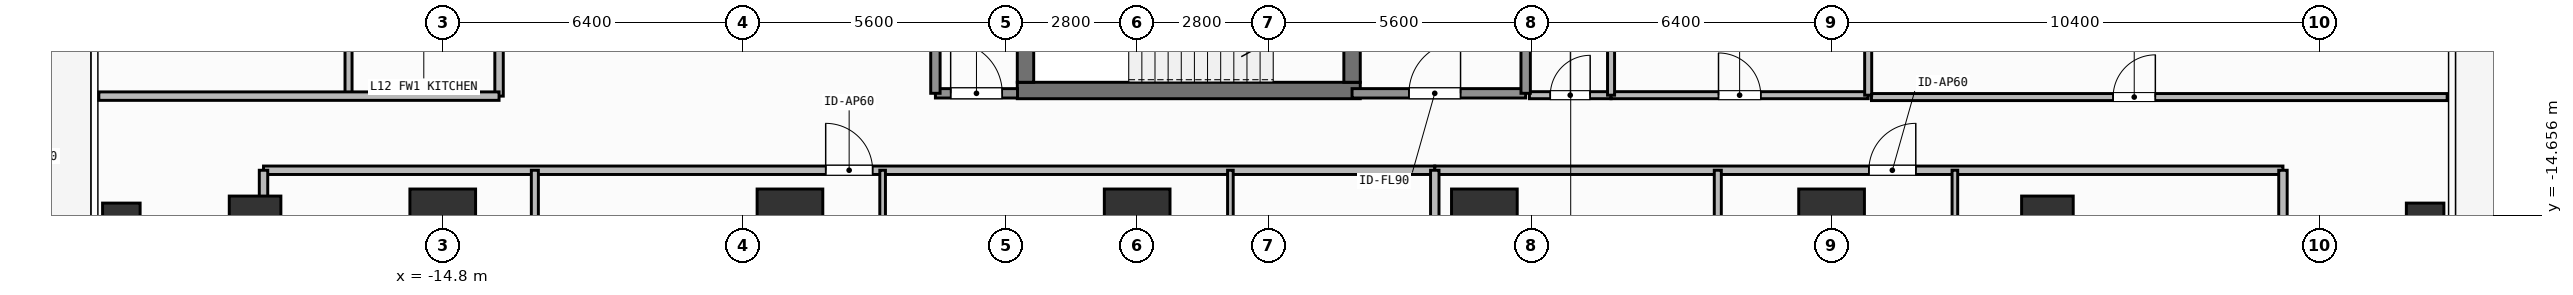
"""IFC4 building model, lengths in metres.
Left out: names, types, materials, properties, quantities, classifications, styles, units other than length and angle.
Written with IfcOpenShell. Run it as: python <this file> out.ifc"""

import sys

from ifc_helpers import new_model, si_unit, direction, frame, frame_2d, origin, origin_2d, place, context, subcontext, project, spatial, rectangle, hollow_rectangle, extrude, element, fill, save


model = new_model("IFC4")
c1 = context("Model", 3, precision=1e-05, world=origin(), true_north=direction((0.0, 1.0)))
c2 = subcontext(c1, "Body", "Model", "MODEL_VIEW")
j1 = project(units=[si_unit("LENGTHUNIT", "METRE"), si_unit("PLANEANGLEUNIT", "RADIAN")], contexts=[c1])
p1 = place(None, origin())
s1 = spatial("IfcSite", under=j1, at=p1, CompositionType="ELEMENT")
p2 = place(p1, origin())
s2 = spatial("IfcBuilding", under=s1, at=p2, CompositionType="ELEMENT")
p3 = place(p2, frame((0.0, 0.0, 46.2)))
s3 = spatial("IfcBuildingStorey", under=s2, at=p3, CompositionType="ELEMENT", Elevation=46.2)
p4 = place(p3, frame((-2.555, -12.0, 0.0), z_axis=(0.0, 0.0, 1.0), x_axis=(1.0, 0.0, 0.0)))
e1 = element("IfcWall", 1, at=p4, inside=s3, PredefinedType="SHEAR", context=c2, shape_type="SweptSolid", body=[
    extrude(rectangle(XDim=7.31, YDim=0.35, at=frame_2d((3.655, 0.0))), origin(), (0.0, 0.0, 1.0), 3.9),
])
p5 = place(p3, frame((-2.38, -11.825, 0.0), z_axis=(0.0, 0.0, 1.0), x_axis=(0.0, 1.0, 0.0)))
e2 = element("IfcWall", 2, at=p5, inside=s3, PredefinedType="SHEAR", context=c2, shape_type="SweptSolid", body=[
    extrude(rectangle(XDim=2.925, YDim=0.35, at=frame_2d((1.462, 0.0))), origin(), (0.0, 0.0, 1.0), 3.9),
])
p6 = place(p3, frame((4.58, -8.9, 0.0), z_axis=(0.0, 0.0, 1.0), x_axis=(0.0, -1.0, 0.0)))
e3 = element("IfcWall", 3, at=p6, inside=s3, PredefinedType="SHEAR", context=c2, shape_type="SweptSolid", body=[
    extrude(rectangle(XDim=2.925, YDim=0.35, at=frame_2d((1.462, 0.0))), origin(), (0.0, 0.0, 1.0), 3.9),
])
p7 = place(p6, frame((0.913, 0.0, 0.0)))
e4 = element("IfcOpeningElement", 4, at=p7, cuts=e3, PredefinedType="OPENING", context=c2, shape_type="SweptSolid", body=[
    extrude(rectangle(XDim=1.1, YDim=2.15, at=frame_2d((0.55, 1.075))), frame((0.0, 0.185, 0.0), z_axis=(0.0, -1.0, 0.0), x_axis=(1.0, 0.0, 0.0)), (0.0, 0.0, 1.0), 0.37),
])
for number, where, z_axis, x_axis in (
    (5, (-14.8, -14.8, 0.0), (0.0, 0.0, 1.0), (1.0, 0.0, 0.0)),
    (6, (-7.4, -14.8, 0.0), (0.0, 0.0, 1.0), (1.0, 0.0, 0.0)),
    (7, (0.0, -14.8, 0.0), (0.0, 0.0, 1.0), (1.0, 0.0, 0.0)),
    (8, (7.4, -14.8, 0.0), (0.0, 0.0, 1.0), (1.0, 0.0, 0.0)),
    (9, (14.8, -14.8, 0.0), (0.0, 0.0, 1.0), (1.0, 0.0, 0.0)),
):
    element("IfcColumn", number, at=place(p3, frame(where, z_axis=z_axis, x_axis=x_axis)), inside=s3, PredefinedType="COLUMN", context=c2, shape_type="SweptSolid", body=[
        extrude(rectangle(XDim=1.4, YDim=1.4, at=origin_2d()), origin(), (0.0, 0.0, 1.0), 3.9),
    ])
for number, where, z_axis, x_axis in (
    (10, (-18.8, -14.8, 0.0), (0.0, 0.0, 1.0), (1.0, 0.0, 0.0)),
    (11, (19.4, -14.8, 0.0), (0.0, 0.0, 1.0), (1.0, 0.0, 0.0)),
):
    element("IfcColumn", number, at=place(p3, frame(where, z_axis=z_axis, x_axis=x_axis)), inside=s3, PredefinedType="COLUMN", context=c2, shape_type="SweptSolid", body=[
        extrude(rectangle(XDim=1.1, YDim=1.1, at=origin_2d()), origin(), (0.0, 0.0, 1.0), 3.9),
    ])
for number, where, z_axis, x_axis in (
    (12, (-21.65, -14.8, 0.0), (0.0, 0.0, 1.0), (1.0, 0.0, 0.0)),
    (13, (27.45, -14.8, 0.0), (0.0, 0.0, 1.0), (1.0, 0.0, 0.0)),
):
    element("IfcColumn", number, at=place(p3, frame(where, z_axis=z_axis, x_axis=x_axis)), inside=s3, PredefinedType="COLUMN", context=c2, shape_type="SweptSolid", body=[
        extrude(hollow_rectangle(XDim=0.8, YDim=0.8, WallThickness=0.036, at=origin_2d()), origin(), (0.0, 0.0, 1.0), 3.9),
    ])
p8 = place(p3, frame((4.58, -12.06, 0.0), z_axis=(0.0, 0.0, 1.0), x_axis=(1.0, 0.0, 0.0)))
e14 = element("IfcWall", 14, at=p8, inside=s3, PredefinedType="SOLIDWALL", context=c2, shape_type="SweptSolid", body=[
    extrude(rectangle(XDim=3.7, YDim=0.2, at=frame_2d((1.85, 0.0))), origin(), (0.0, 0.0, 1.0), 3.68),
])
p9 = place(p8, frame((1.212, 0.0, 0.0)))
e15 = element("IfcOpeningElement", 15, at=p9, cuts=e14, PredefinedType="OPENING", context=c2, shape_type="SweptSolid", body=[
    extrude(rectangle(XDim=1.1, YDim=2.15, at=frame_2d((0.55, 1.075))), frame((0.0, 0.11, 0.0), z_axis=(0.0, -1.0, 0.0), x_axis=(1.0, 0.0, 0.0)), (0.0, 0.0, 1.0), 0.22),
])
p10 = place(p3, frame((-4.3, -12.06, 0.0), z_axis=(0.0, 0.0, 1.0), x_axis=(1.0, 0.0, 0.0)))
e16 = element("IfcWall", 16, at=p10, inside=s3, PredefinedType="SOLIDWALL", context=c2, shape_type="SweptSolid", body=[
    extrude(rectangle(XDim=1.75, YDim=0.2, at=frame_2d((0.875, 0.0))), origin(), (0.0, 0.0, 1.0), 3.68),
])
p11 = place(p10, frame((0.325, 0.0, 0.0)))
e17 = element("IfcOpeningElement", 17, at=p11, cuts=e16, PredefinedType="OPENING", context=c2, shape_type="SweptSolid", body=[
    extrude(rectangle(XDim=1.1, YDim=2.15, at=frame_2d((0.55, 1.075))), frame((0.0, 0.11, 0.0), z_axis=(0.0, -1.0, 0.0), x_axis=(1.0, 0.0, 0.0)), (0.0, 0.0, 1.0), 0.22),
])
p12 = place(p3, frame((8.36, -12.1, 0.0), z_axis=(0.0, 0.0, 1.0), x_axis=(1.0, 0.0, 0.0)))
e18 = element("IfcWall", 18, at=p12, inside=s3, PredefinedType="PARTITIONING", context=c2, shape_type="SweptSolid", body=[
    extrude(rectangle(XDim=1.74, YDim=0.15, at=frame_2d((0.87, 0.0))), origin(), (0.0, 0.0, 1.0), 3.68),
])
p13 = place(p12, frame((0.445, 0.0, 0.0)))
e19 = element("IfcOpeningElement", 19, at=p13, cuts=e18, PredefinedType="OPENING", context=c2, shape_type="SweptSolid", body=[
    extrude(rectangle(XDim=0.85, YDim=2.1, at=frame_2d((0.425, 1.05))), frame((0.0, 0.085, 0.0), z_axis=(0.0, -1.0, 0.0), x_axis=(1.0, 0.0, 0.0)), (0.0, 0.0, 1.0), 0.17),
])
p14 = place(p3, frame((10.1, -12.1, 0.0), z_axis=(0.0, 0.0, 1.0), x_axis=(1.0, 0.0, 0.0)))
e20 = element("IfcWall", 20, at=p14, inside=s3, PredefinedType="PARTITIONING", context=c2, shape_type="SweptSolid", body=[
    extrude(rectangle(XDim=5.48, YDim=0.15, at=frame_2d((2.74, 0.0))), origin(), (0.0, 0.0, 1.0), 3.68),
])
p15 = place(p14, frame((2.29, 0.0, 0.0)))
e21 = element("IfcOpeningElement", 21, at=p15, cuts=e20, PredefinedType="OPENING", context=c2, shape_type="SweptSolid", body=[
    extrude(rectangle(XDim=0.9, YDim=2.1, at=frame_2d((0.45, 1.05))), frame((0.0, 0.085, 0.0), z_axis=(0.0, -1.0, 0.0), x_axis=(1.0, 0.0, 0.0)), (0.0, 0.0, 1.0), 0.17),
])
p16 = place(p3, frame((-18.62, -13.7, 0.0), z_axis=(0.0, 0.0, 1.0), x_axis=(1.0, 0.0, 0.0)))
e22 = element("IfcWall", 22, at=p16, inside=s3, PredefinedType="PARTITIONING", context=c2, shape_type="SweptSolid", body=[
    extrude(rectangle(XDim=24.963, YDim=0.18, at=frame_2d((12.481, 0.0))), origin(), (0.0, 0.0, 1.0), 3.68),
])
p17 = place(p16, frame((11.981, 0.0, 0.0)))
e23 = element("IfcOpeningElement", 23, at=p17, cuts=e22, PredefinedType="OPENING", context=c2, shape_type="SweptSolid", body=[
    extrude(rectangle(XDim=1.0, YDim=2.2, at=frame_2d((0.5, 1.1))), frame((0.0, 0.1, 0.0), z_axis=(0.0, -1.0, 0.0), x_axis=(1.0, 0.0, 0.0)), (0.0, 0.0, 1.0), 0.2),
])
p18 = place(p3, frame((-5.425, -20.79, 0.0), z_axis=(0.0, 0.0, 1.0), x_axis=(0.0, 1.0, 0.0)))
e24 = element("IfcWall", 24, at=p18, inside=s3, PredefinedType="PARTITIONING", context=c2, shape_type="SweptSolid", body=[
    extrude(rectangle(XDim=7.09, YDim=0.12, at=frame_2d((3.545, 0.0))), origin(), (0.0, 0.0, 1.0), 3.68),
])
p19 = place(p18, frame((2.117, 0.0, 0.0)))
e25 = element("IfcOpeningElement", 25, at=p19, cuts=e24, PredefinedType="OPENING", context=c2, shape_type="SweptSolid", body=[
    extrude(rectangle(XDim=0.9, YDim=2.1, at=frame_2d((0.45, 1.05))), frame((0.0, 0.07, 0.0), z_axis=(0.0, -1.0, 0.0), x_axis=(1.0, 0.0, 0.0)), (0.0, 0.0, 1.0), 0.14),
])
p20 = place(p3, frame((-12.837, -20.79, 0.0), z_axis=(0.0, 0.0, 1.0), x_axis=(0.0, 1.0, 0.0)))
e26 = element("IfcWall", 26, at=p20, inside=s3, PredefinedType="PARTITIONING", context=c2, shape_type="SweptSolid", body=[
    extrude(rectangle(XDim=7.09, YDim=0.15, at=frame_2d((3.545, 0.0))), origin(), (0.0, 0.0, 1.0), 3.68),
])
p21 = place(p20, frame((2.133, 0.0, 0.0)))
e27 = element("IfcOpeningElement", 27, at=p21, cuts=e26, PredefinedType="OPENING", context=c2, shape_type="SweptSolid", body=[
    extrude(rectangle(XDim=0.85, YDim=2.1, at=frame_2d((0.425, 1.05))), frame((0.0, 0.085, 0.0), z_axis=(0.0, -1.0, 0.0), x_axis=(1.0, 0.0, 0.0)), (0.0, 0.0, 1.0), 0.17),
])
p22 = place(p3, frame((1.987, -18.663, 0.0), z_axis=(0.0, 0.0, 1.0), x_axis=(0.0, 1.0, 0.0)))
e28 = element("IfcWall", 28, at=p22, inside=s3, PredefinedType="PARTITIONING", context=c2, shape_type="SweptSolid", body=[
    extrude(rectangle(XDim=4.963, YDim=0.12, at=frame_2d((2.481, 0.0))), origin(), (0.0, 0.0, 1.0), 3.68),
])
p23 = place(p22, frame((2.056, 0.0, 0.0)))
e29 = element("IfcOpeningElement", 29, at=p23, cuts=e28, PredefinedType="OPENING", context=c2, shape_type="SweptSolid", body=[
    extrude(rectangle(XDim=0.85, YDim=2.1, at=frame_2d((0.425, 1.05))), frame((0.0, 0.07, 0.0), z_axis=(0.0, -1.0, 0.0), x_axis=(1.0, 0.0, 0.0)), (0.0, 0.0, 1.0), 0.14),
])
p24 = place(p3, frame((6.343, -13.7, 0.0), z_axis=(0.0, 0.0, 1.0), x_axis=(1.0, 0.0, 0.0)))
e30 = element("IfcWall", 30, at=p24, inside=s3, PredefinedType="PARTITIONING", context=c2, shape_type="SweptSolid", body=[
    extrude(rectangle(XDim=18.077, YDim=0.18, at=frame_2d((9.039, 0.0))), origin(), (0.0, 0.0, 1.0), 3.68),
])
p25 = place(p24, frame((9.252, 0.0, 0.0)))
e31 = element("IfcOpeningElement", 31, at=p25, cuts=e30, PredefinedType="OPENING", context=c2, shape_type="SweptSolid", body=[
    extrude(rectangle(XDim=1.0, YDim=2.2, at=frame_2d((0.5, 1.1))), frame((0.0, 0.1, 0.0), z_axis=(0.0, -1.0, 0.0), x_axis=(1.0, 0.0, 0.0)), (0.0, 0.0, 1.0), 0.2),
])
p26 = place(p3, frame((12.375, -20.79, 0.0), z_axis=(0.0, 0.0, 1.0), x_axis=(0.0, 1.0, 0.0)))
e32 = element("IfcWall", 32, at=p26, inside=s3, PredefinedType="PARTITIONING", context=c2, shape_type="SweptSolid", body=[
    extrude(rectangle(XDim=7.09, YDim=0.15, at=frame_2d((3.545, 0.0))), origin(), (0.0, 0.0, 1.0), 3.68),
])
p27 = place(p26, frame((3.03, 0.0, 0.0)))
e33 = element("IfcOpeningElement", 33, at=p27, cuts=e32, PredefinedType="OPENING", context=c2, shape_type="SweptSolid", body=[
    extrude(rectangle(XDim=0.85, YDim=2.1, at=frame_2d((0.425, 1.05))), frame((0.0, 0.085, 0.0), z_axis=(0.0, -1.0, 0.0), x_axis=(1.0, 0.0, 0.0)), (0.0, 0.0, 1.0), 0.17),
])
p28 = place(p3, frame((17.428, -17.883, 0.0), z_axis=(0.0, 0.0, 1.0), x_axis=(0.0, 1.0, 0.0)))
e34 = element("IfcWall", 34, at=p28, inside=s3, PredefinedType="PARTITIONING", context=c2, shape_type="SweptSolid", body=[
    extrude(rectangle(XDim=4.183, YDim=0.12, at=frame_2d((2.092, 0.0))), origin(), (0.0, 0.0, 1.0), 3.68),
])
p29 = place(p28, frame((1.578, 0.0, 0.0)))
e35 = element("IfcOpeningElement", 35, at=p29, cuts=e34, PredefinedType="OPENING", context=c2, shape_type="SweptSolid", body=[
    extrude(rectangle(XDim=0.85, YDim=2.1, at=frame_2d((0.425, 1.05))), frame((0.0, 0.07, 0.0), z_axis=(0.0, -1.0, 0.0), x_axis=(1.0, 0.0, 0.0)), (0.0, 0.0, 1.0), 0.14),
])
p30 = place(p3, frame((-13.6, -12.12, 0.0), z_axis=(0.0, 0.0, 1.0), x_axis=(0.0, 1.0, 0.0)))
e36 = element("IfcWall", 36, at=p30, inside=s3, PredefinedType="PARTITIONING", context=c2, shape_type="SweptSolid", body=[
    extrude(rectangle(XDim=24.24, YDim=0.18, at=frame_2d((12.12, 0.0))), origin(), (0.0, 0.0, 1.0), 3.68),
])
p31 = place(p30, frame((9.829, 0.0, 0.0)))
e37 = element("IfcOpeningElement", 37, at=p31, cuts=e36, PredefinedType="OPENING", context=c2, shape_type="SweptSolid", body=[
    extrude(rectangle(XDim=1.0, YDim=2.2, at=frame_2d((0.5, 1.1))), frame((0.0, 0.1, 0.0), z_axis=(0.0, -1.0, 0.0), x_axis=(1.0, 0.0, 0.0)), (0.0, 0.0, 1.0), 0.2),
])
p32 = place(p3, frame((15.65, -12.14, 0.0), z_axis=(0.0, 0.0, 1.0), x_axis=(1.0, 0.0, 0.0)))
e38 = element("IfcWall", 38, at=p32, inside=s3, PredefinedType="PARTITIONING", context=c2, shape_type="SweptSolid", body=[
    extrude(rectangle(XDim=12.27, YDim=0.15, at=frame_2d((6.135, 0.0))), origin(), (0.0, 0.0, 1.0), 3.68),
])
p33 = place(p32, frame((5.15, 0.0, 0.0)))
e39 = element("IfcOpeningElement", 39, at=p33, cuts=e38, PredefinedType="OPENING", context=c2, shape_type="SweptSolid", body=[
    extrude(rectangle(XDim=0.9, YDim=2.1, at=frame_2d((0.45, 1.05))), frame((0.0, 0.085, 0.0), z_axis=(0.0, -1.0, 0.0), x_axis=(1.0, 0.0, 0.0)), (0.0, 0.0, 1.0), 0.17),
])
for number, where, z_axis, x_axis in (
    (40, (8.28, -12.06, 0.0), (0.0, 0.0, 1.0), (0.0, 1.0, 0.0)),
    (41, (-4.3, -12.06, 0.0), (0.0, 0.0, 1.0), (0.0, 1.0, 0.0)),
):
    element("IfcWall", number, at=place(p3, frame(where, z_axis=z_axis, x_axis=x_axis)), inside=s3, PredefinedType="SOLIDWALL", context=c2, shape_type="SweptSolid", body=[
        extrude(rectangle(XDim=3.11, YDim=0.2, at=frame_2d((1.555, 0.0))), origin(), (0.0, 0.0, 1.0), 3.68),
    ])
p34 = place(p3, frame((10.1, -12.1, 0.0), z_axis=(0.0, 0.0, 1.0), x_axis=(0.0, 1.0, 0.0)))
e42 = element("IfcWall", 42, at=p34, inside=s3, PredefinedType="PARTITIONING", context=c2, shape_type="SweptSolid", body=[
    extrude(rectangle(XDim=2.35, YDim=0.15, at=frame_2d((1.175, 0.0))), origin(), (0.0, 0.0, 1.0), 3.68),
])
p35 = place(p3, frame((15.58, -12.1, 0.0), z_axis=(0.0, 0.0, 1.0), x_axis=(0.0, 1.0, 0.0)))
e43 = element("IfcWall", 43, at=p35, inside=s3, PredefinedType="PARTITIONING", context=c2, shape_type="SweptSolid", body=[
    extrude(rectangle(XDim=6.25, YDim=0.15, at=frame_2d((3.125, 0.0))), origin(), (0.0, 0.0, 1.0), 3.68),
])
p36 = place(p3, frame((-18.62, -23.91, 0.0), z_axis=(0.0, 0.0, 1.0), x_axis=(0.0, 1.0, 0.0)))
e44 = element("IfcWall", 44, at=p36, inside=s3, PredefinedType="PARTITIONING", context=c2, shape_type="SweptSolid", body=[
    extrude(rectangle(XDim=10.21, YDim=0.18, at=frame_2d((5.105, 0.0))), origin(), (0.0, 0.0, 1.0), 3.082),
])
p37 = place(p3, frame((24.42, -23.91, 0.0), z_axis=(0.0, 0.0, 1.0), x_axis=(0.0, 1.0, 0.0)))
e45 = element("IfcWall", 45, at=p37, inside=s3, PredefinedType="PARTITIONING", context=c2, shape_type="SweptSolid", body=[
    extrude(rectangle(XDim=10.21, YDim=0.18, at=frame_2d((5.105, 0.0))), origin(), (0.0, 0.0, 1.0), 3.68),
])
p38 = place(p3, frame((6.343, -25.03, 0.0), z_axis=(0.0, 0.0, 1.0), x_axis=(0.0, 1.0, 0.0)))
e46 = element("IfcWall", 46, at=p38, inside=s3, PredefinedType="PARTITIONING", context=c2, shape_type="SweptSolid", body=[
    extrude(rectangle(XDim=11.33, YDim=0.18, at=frame_2d((5.665, 0.0))), origin(), (0.0, 0.0, 1.0), 3.68),
])
p39 = place(p3, frame((-16.808, -12.12, 0.0), z_axis=(0.0, 0.0, 1.0), x_axis=(0.0, 1.0, 0.0)))
e47 = element("IfcWall", 47, at=p39, inside=s3, PredefinedType="PARTITIONING", context=c2, shape_type="SweptSolid", body=[
    extrude(rectangle(XDim=2.8, YDim=0.15, at=frame_2d((1.4, 0.0))), origin(), (0.0, 0.0, 1.0), 3.68),
])
p40 = place(p3, frame((-22.13, -12.12, 0.0), z_axis=(0.0, 0.0, 1.0), x_axis=(1.0, 0.0, 0.0)))
e48 = element("IfcWall", 48, at=p40, inside=s3, PredefinedType="PARTITIONING", context=c2, shape_type="SweptSolid", body=[
    extrude(rectangle(XDim=8.53, YDim=0.18, at=frame_2d((4.265, 0.0))), origin(), (0.0, 0.0, 1.0), 3.68),
])
p41 = place(p9, origin())
e49 = element("IfcDoor", 49, at=p41, inside=s3, OperationType="SINGLE_SWING_RIGHT", PredefinedType="DOOR", context=c2, shape_type="SweptSolid", body=[
    extrude(rectangle(XDim=1.1, YDim=2.15, at=frame_2d((0.55, 1.075))), frame((0.0, 0.025, 0.0), z_axis=(0.0, -1.0, 0.0), x_axis=(1.0, 0.0, 0.0)), (0.0, 0.0, 1.0), 0.05),
])
fill(e15, e49)
p42 = place(p11, origin())
e50 = element("IfcDoor", 50, at=p42, inside=s3, OperationType="SINGLE_SWING_LEFT", PredefinedType="DOOR", context=c2, shape_type="SweptSolid", body=[
    extrude(rectangle(XDim=1.1, YDim=2.15, at=frame_2d((0.55, 1.075))), frame((0.0, 0.025, 0.0), z_axis=(0.0, -1.0, 0.0), x_axis=(1.0, 0.0, 0.0)), (0.0, 0.0, 1.0), 0.05),
])
fill(e17, e50)
p43 = place(p13, origin())
e51 = element("IfcDoor", 51, at=p43, inside=s3, OperationType="SINGLE_SWING_RIGHT", PredefinedType="DOOR", context=c2, shape_type="SweptSolid", body=[
    extrude(rectangle(XDim=0.85, YDim=2.1, at=frame_2d((0.425, 1.05))), frame((0.0, 0.025, 0.0), z_axis=(0.0, -1.0, 0.0), x_axis=(1.0, 0.0, 0.0)), (0.0, 0.0, 1.0), 0.05),
])
fill(e19, e51)
p44 = place(p15, origin())
e52 = element("IfcDoor", 52, at=p44, inside=s3, OperationType="SINGLE_SWING_LEFT", PredefinedType="DOOR", context=c2, shape_type="SweptSolid", body=[
    extrude(rectangle(XDim=0.9, YDim=2.1, at=frame_2d((0.45, 1.05))), frame((0.0, 0.025, 0.0), z_axis=(0.0, -1.0, 0.0), x_axis=(1.0, 0.0, 0.0)), (0.0, 0.0, 1.0), 0.05),
])
fill(e21, e52)
p45 = place(p17, origin())
e53 = element("IfcDoor", 53, at=p45, inside=s3, OperationType="SINGLE_SWING_LEFT", PredefinedType="DOOR", context=c2, shape_type="SweptSolid", body=[
    extrude(rectangle(XDim=1.0, YDim=2.2, at=frame_2d((0.5, 1.1))), frame((0.0, 0.025, 0.0), z_axis=(0.0, -1.0, 0.0), x_axis=(1.0, 0.0, 0.0)), (0.0, 0.0, 1.0), 0.05),
])
fill(e23, e53)
p46 = place(p25, origin())
e54 = element("IfcDoor", 54, at=p46, inside=s3, OperationType="SINGLE_SWING_RIGHT", PredefinedType="DOOR", context=c2, shape_type="SweptSolid", body=[
    extrude(rectangle(XDim=1.0, YDim=2.2, at=frame_2d((0.5, 1.1))), frame((0.0, 0.025, 0.0), z_axis=(0.0, -1.0, 0.0), x_axis=(1.0, 0.0, 0.0)), (0.0, 0.0, 1.0), 0.05),
])
fill(e31, e54)
p47 = place(p33, origin())
e55 = element("IfcDoor", 55, at=p47, inside=s3, OperationType="SINGLE_SWING_RIGHT", PredefinedType="DOOR", context=c2, shape_type="SweptSolid", body=[
    extrude(rectangle(XDim=0.9, YDim=2.1, at=frame_2d((0.45, 1.05))), frame((0.0, 0.025, 0.0), z_axis=(0.0, -1.0, 0.0), x_axis=(1.0, 0.0, 0.0)), (0.0, 0.0, 1.0), 0.05),
])
fill(e39, e55)
save(model, sys.argv[1])
